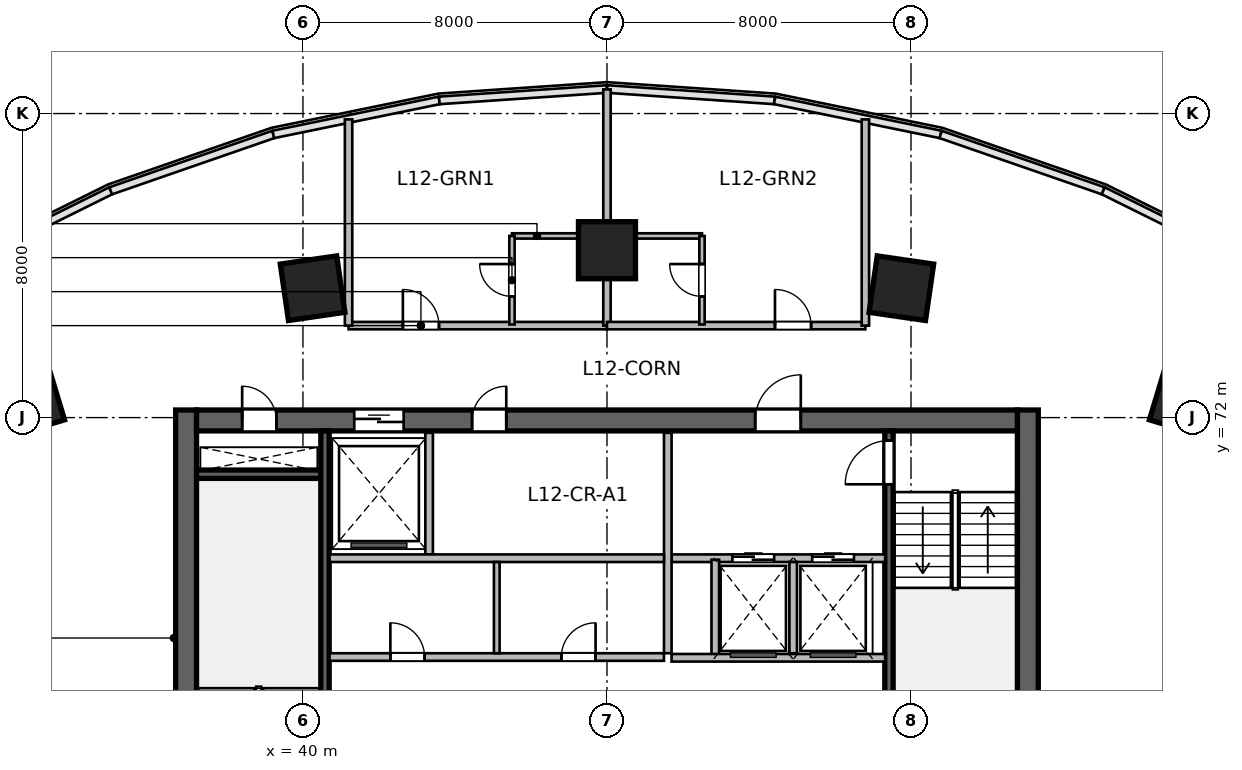
"""IFC4 building model, lengths in metres.
Left out: names, types, materials, properties, quantities, classifications, styles, units other than length and angle.
Written with IfcOpenShell. Run it as: python <this file> out.ifc"""

import sys

from ifc_helpers import new_model, si_unit, direction, frame, frame_2d, origin, origin_2d, place, context, subcontext, project, spatial, rectangle, extrude, source, transform, mapped, element, fill, save


model = new_model("IFC4")
c1 = context("Model", 3, precision=1e-05, world=origin(), true_north=direction((0.0, 1.0)))
c2 = subcontext(c1, "Body", "Model", "MODEL_VIEW")
j1 = project(units=[si_unit("LENGTHUNIT", "METRE"), si_unit("PLANEANGLEUNIT", "RADIAN")], contexts=[c1])
p1 = place(None, origin())
s1 = spatial("IfcSite", under=j1, at=p1, CompositionType="ELEMENT")
p2 = place(p1, origin())
s2 = spatial("IfcBuilding", under=s1, at=p2, CompositionType="ELEMENT")
p3 = place(p2, frame((0.0, 0.0, 57.0)))
s3 = spatial("IfcBuildingStorey", under=s2, at=p3, CompositionType="ELEMENT", Elevation=57.0)
m1 = source(origin(), c2, "Body", "SweptSolid", [
    extrude(rectangle(XDim=12.0, YDim=0.55, at=frame_2d((6.0, 0.0))), origin(), (0.0, 0.0, 1.0), 3.6),
])
for number, where, z_axis, x_axis in (
    (1, (36.925, 60.2, 0.0), (0.0, 0.0, 1.0), (0.0, 1.0, 0.0)),
    (2, (59.075, 60.2, 0.0), (0.0, 0.0, 1.0), (0.0, 1.0, 0.0)),
):
    element("IfcWall", number, at=place(p3, frame(where, z_axis=z_axis, x_axis=x_axis)), inside=s3, PredefinedType="SHEAR", context=c2, shape_type="MappedRepresentation", body=[
        mapped(m1, transform((0.0, 0.0, 0.0), scale=1.0)),
    ])
m2 = source(origin(), c2, "Body", "SweptSolid", [
    extrude(rectangle(XDim=21.6, YDim=0.55, at=frame_2d((10.8, 0.0))), origin(), (0.0, 0.0, 1.0), 3.6),
])
p4 = place(p3, frame((37.2, 71.925, 0.0), z_axis=(0.0, 0.0, 1.0), x_axis=(1.0, 0.0, 0.0)))
e3 = element("IfcWall", 3, at=p4, inside=s3, PredefinedType="SHEAR", context=c2, shape_type="MappedRepresentation", body=[
    mapped(m2, transform((0.0, 0.0, 0.0), scale=1.0)),
])
p5 = place(p4, frame((1.2, 0.0, 0.0)))
e4 = element("IfcOpeningElement", 4, at=p5, cuts=e3, PredefinedType="OPENING", context=c2, shape_type="SweptSolid", body=[
    extrude(rectangle(XDim=0.9, YDim=2.1, at=frame_2d((0.45, 1.05))), frame((0.0, 0.285, 0.0), z_axis=(0.0, -1.0, 0.0), x_axis=(1.0, 0.0, 0.0)), (0.0, 0.0, 1.0), 0.57),
])
p6 = place(p4, frame((14.7, 0.0, 0.0)))
e5 = element("IfcOpeningElement", 5, at=p6, cuts=e3, PredefinedType="OPENING", context=c2, shape_type="SweptSolid", body=[
    extrude(rectangle(XDim=1.2, YDim=2.15, at=frame_2d((0.6, 1.075))), frame((0.0, 0.285, 0.0), z_axis=(0.0, -1.0, 0.0), x_axis=(1.0, 0.0, 0.0)), (0.0, 0.0, 1.0), 0.57),
])
p7 = place(p4, frame((4.15, 0.0, 0.0)))
e6 = element("IfcOpeningElement", 6, at=p7, cuts=e3, PredefinedType="OPENING", context=c2, shape_type="SweptSolid", body=[
    extrude(rectangle(XDim=1.3, YDim=2.15, at=frame_2d((0.65, 1.075))), frame((0.0, 0.285, 0.0), z_axis=(0.0, -1.0, 0.0), x_axis=(1.0, 0.0, 0.0)), (0.0, 0.0, 1.0), 0.57),
])
p8 = place(p4, frame((7.25, 0.0, 0.0)))
e7 = element("IfcOpeningElement", 7, at=p8, cuts=e3, PredefinedType="OPENING", context=c2, shape_type="SweptSolid", body=[
    extrude(rectangle(XDim=0.9, YDim=2.1, at=frame_2d((0.45, 1.05))), frame((0.0, 0.285, 0.0), z_axis=(0.0, -1.0, 0.0), x_axis=(1.0, 0.0, 0.0)), (0.0, 0.0, 1.0), 0.57),
])
m3 = source(origin(), c2, "Body", "SweptSolid", [
    extrude(rectangle(XDim=3.27, YDim=0.22, at=frame_2d((1.635, 0.0))), origin(), (0.0, 0.0, 1.0), 3.6),
])
p9 = place(p3, frame((37.2, 70.51, 0.0), z_axis=(0.0, 0.0, 1.0), x_axis=(1.0, 0.0, 0.0)))
e8 = element("IfcWall", 8, at=p9, inside=s3, PredefinedType="SHEAR", context=c2, shape_type="MappedRepresentation", body=[
    mapped(m3, transform((0.0, 0.0, 0.0), scale=1.0)),
])
m4 = source(origin(), c2, "Body", "SweptSolid", [
    extrude(rectangle(XDim=10.9, YDim=0.22, at=frame_2d((5.45, 0.0))), origin(), (0.0, 0.0, 1.0), 3.6),
])
p10 = place(p3, frame((40.58, 60.75, 0.0), z_axis=(0.0, 0.0, 1.0), x_axis=(0.0, 1.0, 0.0)))
e9 = element("IfcWall", 9, at=p10, inside=s3, PredefinedType="SHEAR", context=c2, shape_type="MappedRepresentation", body=[
    mapped(m4, transform((0.0, 0.0, 0.0), scale=1.0)),
])
p11 = place(p3, frame((55.42, 60.75, 0.0), z_axis=(0.0, 0.0, 1.0), x_axis=(0.0, 1.0, 0.0)))
e10 = element("IfcWall", 10, at=p11, inside=s3, PredefinedType="SHEAR", context=c2, shape_type="MappedRepresentation", body=[
    mapped(m4, transform((0.0, 0.0, 0.0), scale=1.0)),
])
p12 = place(p11, frame((9.495, 0.0, 0.0)))
e11 = element("IfcOpeningElement", 11, at=p12, cuts=e10, PredefinedType="OPENING", context=c2, shape_type="SweptSolid", body=[
    extrude(rectangle(XDim=1.15, YDim=2.15, at=frame_2d((0.575, 1.075))), frame((0.0, 0.12, 0.0), z_axis=(0.0, -1.0, 0.0), x_axis=(1.0, 0.0, 0.0)), (0.0, 0.0, 1.0), 0.24),
])
m5 = source(origin(), c2, "Body", "SweptSolid", [
    extrude(rectangle(XDim=1.5, YDim=1.5, at=origin_2d()), origin(), (0.0, 0.0, 1.0), 3.6),
])
for number, where, z_axis, x_axis in (
    (12, (32.791, 72.442, 0.0), (0.0, 0.0, 1.0), (-0.289, 0.957, 0.0)),
    (13, (40.253, 75.404, 0.0), (0.0, 0.0, 1.0), (-0.143, 0.99, 0.0)),
    (14, (48.0, 76.404, 0.0), (0.0, 0.0, 1.0), (0.0, 1.0, 0.0)),
    (15, (55.747, 75.404, 0.0), (0.0, 0.0, 1.0), (0.143, 0.99, 0.0)),
    (16, (63.209, 72.442, 0.0), (0.0, 0.0, 1.0), (0.289, 0.957, 0.0)),
):
    element("IfcColumn", number, at=place(p3, frame(where, z_axis=z_axis, x_axis=x_axis)), inside=s3, PredefinedType="COLUMN", context=c2, shape_type="MappedRepresentation", body=[
        mapped(m5, transform((0.0, 0.0, 0.0), scale=1.0)),
    ])
m6 = source(origin(), c2, "Body", "SweptSolid", [
    extrude(rectangle(XDim=5.62, YDim=0.2, at=frame_2d((2.81, 0.0))), origin(), (0.0, 0.0, 1.0), 3.36),
])
p13 = place(p3, frame((49.7, 68.3, 0.0), z_axis=(0.0, 0.0, 1.0), x_axis=(1.0, 0.0, 0.0)))
e17 = element("IfcWall", 17, at=p13, inside=s3, PredefinedType="SOLIDWALL", context=c2, shape_type="MappedRepresentation", body=[
    mapped(m6, transform((0.0, 0.0, 0.0), scale=1.0)),
])
p14 = place(p13, frame((1.6, 0.0, 0.0)))
e18 = element("IfcOpeningElement", 18, at=p14, cuts=e17, PredefinedType="OPENING", context=c2, shape_type="SweptSolid", body=[
    extrude(rectangle(XDim=1.1, YDim=2.15, at=frame_2d((0.55, 1.075))), frame((0.0, 0.11, 0.0), z_axis=(0.0, -1.0, 0.0), x_axis=(1.0, 0.0, 0.0)), (0.0, 0.0, 1.0), 0.22),
])
p15 = place(p13, frame((3.7, 0.0, 0.0)))
e19 = element("IfcOpeningElement", 19, at=p15, cuts=e17, PredefinedType="OPENING", context=c2, shape_type="SweptSolid", body=[
    extrude(rectangle(XDim=1.1, YDim=2.15, at=frame_2d((0.55, 1.075))), frame((0.0, 0.11, 0.0), z_axis=(0.0, -1.0, 0.0), x_axis=(1.0, 0.0, 0.0)), (0.0, 0.0, 1.0), 0.22),
])
m7 = source(origin(), c2, "Body", "SweptSolid", [
    extrude(rectangle(XDim=5.8, YDim=0.2, at=frame_2d((2.9, 0.0))), origin(), (0.0, 0.0, 1.0), 3.36),
])
p16 = place(p3, frame((49.6, 65.8, 0.0), z_axis=(0.0, 0.0, 1.0), x_axis=(0.0, 1.0, 0.0)))
e20 = element("IfcWall", 20, at=p16, inside=s3, PredefinedType="SOLIDWALL", context=c2, shape_type="MappedRepresentation", body=[
    mapped(m7, transform((0.0, 0.0, 0.0), scale=1.0)),
])
m8 = source(origin(), c2, "Body", "SweptSolid", [
    extrude(rectangle(XDim=2.58, YDim=0.2, at=frame_2d((1.29, 0.0))), origin(), (0.0, 0.0, 1.0), 3.36),
])
p17 = place(p3, frame((50.85, 65.68, 0.0), z_axis=(0.0, 0.0, 1.0), x_axis=(0.0, 1.0, 0.0)))
e21 = element("IfcWall", 21, at=p17, inside=s3, PredefinedType="SOLIDWALL", context=c2, shape_type="MappedRepresentation", body=[
    mapped(m8, transform((0.0, 0.0, 0.0), scale=1.0)),
])
m9 = source(origin(), c2, "Body", "SweptSolid", [
    extrude(rectangle(XDim=2.4, YDim=0.2, at=frame_2d((1.2, 0.0))), origin(), (0.0, 0.0, 1.0), 3.36),
])
p18 = place(p3, frame((52.9, 65.8, 0.0), z_axis=(0.0, 0.0, 1.0), x_axis=(0.0, 1.0, 0.0)))
e22 = element("IfcWall", 22, at=p18, inside=s3, PredefinedType="SOLIDWALL", context=c2, shape_type="MappedRepresentation", body=[
    mapped(m9, transform((0.0, 0.0, 0.0), scale=1.0)),
])
p19 = place(p3, frame((49.7, 65.68, 0.0), z_axis=(0.0, 0.0, 1.0), x_axis=(1.0, 0.0, 0.0)))
e23 = element("IfcWall", 23, at=p19, inside=s3, PredefinedType="SOLIDWALL", context=c2, shape_type="MappedRepresentation", body=[
    mapped(m6, transform((0.0, 0.0, 0.0), scale=1.0)),
])
m10 = source(origin(), c2, "Body", "SweptSolid", [
    extrude(rectangle(XDim=3.2, YDim=0.2, at=frame_2d((1.6, 0.0))), origin(), (0.0, 0.0, 1.0), 3.36),
])
p20 = place(p3, frame((43.32, 68.4, 0.0), z_axis=(0.0, 0.0, 1.0), x_axis=(0.0, 1.0, 0.0)))
e24 = element("IfcWall", 24, at=p20, inside=s3, PredefinedType="SOLIDWALL", context=c2, shape_type="MappedRepresentation", body=[
    mapped(m10, transform((0.0, 0.0, 0.0), scale=1.0)),
])
m11 = source(origin(), c2, "Body", "SweptSolid", [
    extrude(rectangle(XDim=8.8, YDim=0.2, at=frame_2d((4.4, 0.0))), origin(), (0.0, 0.0, 1.0), 3.36),
])
p21 = place(p3, frame((40.7, 68.3, 0.0), z_axis=(0.0, 0.0, 1.0), x_axis=(1.0, 0.0, 0.0)))
e25 = element("IfcWall", 25, at=p21, inside=s3, PredefinedType="SOLIDWALL", context=c2, shape_type="MappedRepresentation", body=[
    mapped(m11, transform((0.0, 0.0, 0.0), scale=1.0)),
])
p22 = place(p3, frame((40.7, 65.7, 0.0), z_axis=(0.0, 0.0, 1.0), x_axis=(1.0, 0.0, 0.0)))
e26 = element("IfcWall", 26, at=p22, inside=s3, PredefinedType="SOLIDWALL", context=c2, shape_type="MappedRepresentation", body=[
    mapped(m11, transform((0.0, 0.0, 0.0), scale=1.0)),
])
p23 = place(p22, frame((1.6, 0.0, 0.0)))
e27 = element("IfcOpeningElement", 27, at=p23, cuts=e26, PredefinedType="OPENING", context=c2, shape_type="SweptSolid", body=[
    extrude(rectangle(XDim=0.9, YDim=2.1, at=frame_2d((0.45, 1.05))), frame((0.0, 0.11, 0.0), z_axis=(0.0, -1.0, 0.0), x_axis=(1.0, 0.0, 0.0)), (0.0, 0.0, 1.0), 0.22),
])
p24 = place(p22, frame((6.1, 0.0, 0.0)))
e28 = element("IfcOpeningElement", 28, at=p24, cuts=e26, PredefinedType="OPENING", context=c2, shape_type="SweptSolid", body=[
    extrude(rectangle(XDim=0.9, YDim=2.1, at=frame_2d((0.45, 1.05))), frame((0.0, 0.11, 0.0), z_axis=(0.0, -1.0, 0.0), x_axis=(1.0, 0.0, 0.0)), (0.0, 0.0, 1.0), 0.22),
])
m12 = source(origin(), c2, "Body", "SweptSolid", [
    extrude(rectangle(XDim=2.4, YDim=0.15, at=frame_2d((1.2, 0.0))), origin(), (0.0, 0.0, 1.0), 3.36),
])
p25 = place(p3, frame((45.1, 65.8, 0.0), z_axis=(0.0, 0.0, 1.0), x_axis=(0.0, 1.0, 0.0)))
e29 = element("IfcWall", 29, at=p25, inside=s3, PredefinedType="PARTITIONING", context=c2, shape_type="MappedRepresentation", body=[
    mapped(m12, transform((0.0, 0.0, 0.0), scale=1.0)),
])
m13 = source(origin(), c2, "Body", "SweptSolid", [
    extrude(rectangle(XDim=6.8, YDim=0.195, at=frame_2d((3.4, 0.0))), origin(), (0.0, 0.0, 1.0), 3.36),
])
p26 = place(p3, frame((41.2, 74.42, 0.0), z_axis=(0.0, 0.0, 1.0), x_axis=(1.0, 0.0, 0.0)))
e30 = element("IfcWall", 30, at=p26, inside=s3, PredefinedType="PARTITIONING", context=c2, shape_type="MappedRepresentation", body=[
    mapped(m13, transform((0.0, 0.0, 0.0), scale=1.0)),
])
p27 = place(p26, frame((1.429, 0.0, 0.0)))
e31 = element("IfcOpeningElement", 31, at=p27, cuts=e30, PredefinedType="OPENING", context=c2, shape_type="SweptSolid", body=[
    extrude(rectangle(XDim=0.95, YDim=2.15, at=frame_2d((0.475, 1.075))), frame((0.0, 0.107, 0.0), z_axis=(0.0, -1.0, 0.0), x_axis=(1.0, 0.0, 0.0)), (0.0, 0.0, 1.0), 0.215),
])
m14 = source(origin(), c2, "Body", "SweptSolid", [
    extrude(rectangle(XDim=6.216, YDim=0.195, at=frame_2d((3.108, 0.0))), origin(), (0.0, 0.0, 1.0), 2.644),
])
p28 = place(p3, frame((48.0, 74.42, 0.0), z_axis=(0.0, 0.0, 1.0), x_axis=(0.0, 1.0, 0.0)))
e32 = element("IfcWall", 32, at=p28, inside=s3, PredefinedType="PARTITIONING", context=c2, shape_type="MappedRepresentation", body=[
    mapped(m14, transform((0.0, 0.0, 0.0), scale=1.0)),
])
m15 = source(origin(), c2, "Body", "SweptSolid", [
    extrude(rectangle(XDim=5.426, YDim=0.195, at=frame_2d((2.713, 0.0))), origin(), (0.0, 0.0, 1.0), 3.36),
])
p29 = place(p3, frame((41.2, 74.42, 0.0), z_axis=(0.0, 0.0, 1.0), x_axis=(0.0, 1.0, 0.0)))
e33 = element("IfcWall", 33, at=p29, inside=s3, PredefinedType="PARTITIONING", context=c2, shape_type="MappedRepresentation", body=[
    mapped(m15, transform((0.0, 0.0, 0.0), scale=1.0)),
])
m16 = source(origin(), c2, "Body", "SweptSolid", [
    extrude(rectangle(XDim=2.35, YDim=0.14, at=frame_2d((1.175, 0.0))), origin(), (0.0, 0.0, 1.0), 3.36),
])
p30 = place(p3, frame((45.5, 76.78, 0.0), z_axis=(0.0, 0.0, 1.0), x_axis=(1.0, 0.0, 0.0)))
e34 = element("IfcWall", 34, at=p30, inside=s3, PredefinedType="PARTITIONING", context=c2, shape_type="MappedRepresentation", body=[
    mapped(m16, transform((0.0, 0.0, 0.0), scale=1.0)),
])
m17 = source(origin(), c2, "Body", "SweptSolid", [
    extrude(rectangle(XDim=2.33, YDim=0.14, at=frame_2d((1.165, 0.0))), origin(), (0.0, 0.0, 1.0), 3.36),
])
p31 = place(p3, frame((45.5, 74.45, 0.0), z_axis=(0.0, 0.0, 1.0), x_axis=(0.0, 1.0, 0.0)))
e35 = element("IfcWall", 35, at=p31, inside=s3, PredefinedType="PARTITIONING", context=c2, shape_type="MappedRepresentation", body=[
    mapped(m17, transform((0.0, 0.0, 0.0), scale=1.0)),
])
p32 = place(p31, frame((0.74, 0.0, 0.0)))
e36 = element("IfcOpeningElement", 36, at=p32, cuts=e35, PredefinedType="OPENING", context=c2, shape_type="SweptSolid", body=[
    extrude(rectangle(XDim=0.85, YDim=2.05, at=frame_2d((0.425, 1.025))), frame((0.0, 0.08, 0.0), z_axis=(0.0, -1.0, 0.0), x_axis=(1.0, 0.0, 0.0)), (0.0, 0.0, 1.0), 0.16),
])
p33 = place(p3, frame((48.0, 74.42, 0.0), z_axis=(0.0, 0.0, 1.0), x_axis=(1.0, 0.0, 0.0)))
e37 = element("IfcWall", 37, at=p33, inside=s3, PredefinedType="PARTITIONING", context=c2, shape_type="MappedRepresentation", body=[
    mapped(m13, transform((0.0, 0.0, 0.0), scale=1.0)),
])
p34 = place(p33, frame((4.421, 0.0, 0.0)))
e38 = element("IfcOpeningElement", 38, at=p34, cuts=e37, PredefinedType="OPENING", context=c2, shape_type="SweptSolid", body=[
    extrude(rectangle(XDim=0.95, YDim=2.15, at=frame_2d((0.475, 1.075))), frame((0.0, 0.107, 0.0), z_axis=(0.0, -1.0, 0.0), x_axis=(1.0, 0.0, 0.0)), (0.0, 0.0, 1.0), 0.215),
])
p35 = place(p3, frame((54.8, 74.42, 0.0), z_axis=(0.0, 0.0, 1.0), x_axis=(0.0, 1.0, 0.0)))
e39 = element("IfcWall", 39, at=p35, inside=s3, PredefinedType="PARTITIONING", context=c2, shape_type="MappedRepresentation", body=[
    mapped(m15, transform((0.0, 0.0, 0.0), scale=1.0)),
])
p36 = place(p3, frame((48.15, 76.78, 0.0), z_axis=(0.0, 0.0, 1.0), x_axis=(1.0, 0.0, 0.0)))
e40 = element("IfcWall", 40, at=p36, inside=s3, PredefinedType="PARTITIONING", context=c2, shape_type="MappedRepresentation", body=[
    mapped(m16, transform((0.0, 0.0, 0.0), scale=1.0)),
])
p37 = place(p3, frame((50.5, 74.45, 0.0), z_axis=(0.0, 0.0, 1.0), x_axis=(0.0, 1.0, 0.0)))
e41 = element("IfcWall", 41, at=p37, inside=s3, PredefinedType="PARTITIONING", context=c2, shape_type="MappedRepresentation", body=[
    mapped(m17, transform((0.0, 0.0, 0.0), scale=1.0)),
])
p38 = place(p37, frame((0.74, 0.0, 0.0)))
e42 = element("IfcOpeningElement", 42, at=p38, cuts=e41, PredefinedType="OPENING", context=c2, shape_type="SweptSolid", body=[
    extrude(rectangle(XDim=0.85, YDim=2.05, at=frame_2d((0.425, 1.025))), frame((0.0, 0.08, 0.0), z_axis=(0.0, -1.0, 0.0), x_axis=(1.0, 0.0, 0.0)), (0.0, 0.0, 1.0), 0.16),
])
m18 = source(origin(), c2, "Body", "SweptSolid", [
    extrude(rectangle(XDim=0.9, YDim=2.1, at=frame_2d((0.45, 1.05))), frame((0.0, 0.025, 0.0), z_axis=(0.0, -1.0, 0.0), x_axis=(1.0, 0.0, 0.0)), (0.0, 0.0, 1.0), 0.05),
])
p39 = place(p5, origin())
e43 = element("IfcDoor", 43, at=p39, inside=s3, OperationType="SINGLE_SWING_LEFT", PredefinedType="DOOR", context=c2, shape_type="MappedRepresentation", body=[
    mapped(m18, transform((0.0, 0.0, 0.0), scale=1.0)),
])
fill(e4, e43)
m19 = source(origin(), c2, "Body", "SweptSolid", [
    extrude(rectangle(XDim=1.15, YDim=2.15, at=frame_2d((0.575, 1.075))), frame((0.0, 0.025, 0.0), z_axis=(0.0, -1.0, 0.0), x_axis=(1.0, 0.0, 0.0)), (0.0, 0.0, 1.0), 0.05),
])
p40 = place(p12, origin())
e44 = element("IfcDoor", 44, at=p40, inside=s3, OperationType="SINGLE_SWING_LEFT", PredefinedType="DOOR", context=c2, shape_type="MappedRepresentation", body=[
    mapped(m19, transform((0.0, 0.0, 0.0), scale=1.0)),
])
fill(e11, e44)
m20 = source(origin(), c2, "Body", "SweptSolid", [
    extrude(rectangle(XDim=1.2, YDim=2.15, at=frame_2d((0.6, 1.075))), frame((0.0, 0.025, 0.0), z_axis=(0.0, -1.0, 0.0), x_axis=(1.0, 0.0, 0.0)), (0.0, 0.0, 1.0), 0.05),
])
p41 = place(p6, origin())
e45 = element("IfcDoor", 45, at=p41, inside=s3, OperationType="SINGLE_SWING_RIGHT", PredefinedType="DOOR", context=c2, shape_type="MappedRepresentation", body=[
    mapped(m20, transform((0.0, 0.0, 0.0), scale=1.0)),
])
fill(e5, e45)
m21 = source(origin(), c2, "Body", "SweptSolid", [
    extrude(rectangle(XDim=1.1, YDim=2.15, at=frame_2d((0.55, 1.075))), frame((0.0, 0.025, 0.0), z_axis=(0.0, -1.0, 0.0), x_axis=(1.0, 0.0, 0.0)), (0.0, 0.0, 1.0), 0.05),
])
p42 = place(p14, origin())
e46 = element("IfcDoor", 46, at=p42, inside=s3, OperationType="DOUBLE_DOOR_SLIDING", PredefinedType="DOOR", context=c2, shape_type="MappedRepresentation", body=[
    mapped(m21, transform((0.0, 0.0, 0.0), scale=1.0)),
])
fill(e18, e46)
p43 = place(p15, origin())
e47 = element("IfcDoor", 47, at=p43, inside=s3, OperationType="DOUBLE_DOOR_SLIDING", PredefinedType="DOOR", context=c2, shape_type="MappedRepresentation", body=[
    mapped(m21, transform((0.0, 0.0, 0.0), scale=1.0)),
])
fill(e19, e47)
m22 = source(origin(), c2, "Body", "SweptSolid", [
    extrude(rectangle(XDim=1.3, YDim=2.15, at=frame_2d((0.65, 1.075))), frame((0.0, 0.025, 0.0), z_axis=(0.0, -1.0, 0.0), x_axis=(1.0, 0.0, 0.0)), (0.0, 0.0, 1.0), 0.05),
])
p44 = place(p7, origin())
e48 = element("IfcDoor", 48, at=p44, inside=s3, OperationType="DOUBLE_DOOR_SLIDING", PredefinedType="DOOR", context=c2, shape_type="MappedRepresentation", body=[
    mapped(m22, transform((0.0, 0.0, 0.0), scale=1.0)),
])
fill(e6, e48)
p45 = place(p8, origin())
e49 = element("IfcDoor", 49, at=p45, inside=s3, OperationType="SINGLE_SWING_RIGHT", PredefinedType="DOOR", context=c2, shape_type="MappedRepresentation", body=[
    mapped(m18, transform((0.0, 0.0, 0.0), scale=1.0)),
])
fill(e7, e49)
p46 = place(p23, origin())
e50 = element("IfcDoor", 50, at=p46, inside=s3, OperationType="SINGLE_SWING_LEFT", PredefinedType="DOOR", context=c2, shape_type="MappedRepresentation", body=[
    mapped(m18, transform((0.0, 0.0, 0.0), scale=1.0)),
])
fill(e27, e50)
p47 = place(p24, origin())
e51 = element("IfcDoor", 51, at=p47, inside=s3, OperationType="SINGLE_SWING_RIGHT", PredefinedType="DOOR", context=c2, shape_type="MappedRepresentation", body=[
    mapped(m18, transform((0.0, 0.0, 0.0), scale=1.0)),
])
fill(e28, e51)
m23 = source(origin(), c2, "Body", "SweptSolid", [
    extrude(rectangle(XDim=0.95, YDim=2.15, at=frame_2d((0.475, 1.075))), frame((0.0, 0.025, 0.0), z_axis=(0.0, -1.0, 0.0), x_axis=(1.0, 0.0, 0.0)), (0.0, 0.0, 1.0), 0.05),
])
p48 = place(p27, origin())
e52 = element("IfcDoor", 52, at=p48, inside=s3, OperationType="SINGLE_SWING_LEFT", PredefinedType="DOOR", context=c2, shape_type="MappedRepresentation", body=[
    mapped(m23, transform((0.0, 0.0, 0.0), scale=1.0)),
])
fill(e31, e52)
m24 = source(origin(), c2, "Body", "SweptSolid", [
    extrude(rectangle(XDim=0.85, YDim=2.05, at=frame_2d((0.425, 1.025))), frame((0.0, 0.025, 0.0), z_axis=(0.0, -1.0, 0.0), x_axis=(1.0, 0.0, 0.0)), (0.0, 0.0, 1.0), 0.05),
])
p49 = place(p32, origin())
e53 = element("IfcDoor", 53, at=p49, inside=s3, OperationType="SINGLE_SWING_RIGHT", PredefinedType="DOOR", context=c2, shape_type="MappedRepresentation", body=[
    mapped(m24, transform((0.0, 0.0, 0.0), scale=1.0)),
])
fill(e36, e53)
p50 = place(p34, origin())
e54 = element("IfcDoor", 54, at=p50, inside=s3, OperationType="SINGLE_SWING_LEFT", PredefinedType="DOOR", context=c2, shape_type="MappedRepresentation", body=[
    mapped(m23, transform((0.0, 0.0, 0.0), scale=1.0)),
])
fill(e38, e54)
p51 = place(p38, origin())
e55 = element("IfcDoor", 55, at=p51, inside=s3, OperationType="SINGLE_SWING_RIGHT", PredefinedType="DOOR", context=c2, shape_type="MappedRepresentation", body=[
    mapped(m24, transform((0.0, 0.0, 0.0), scale=1.0)),
])
fill(e42, e55)
save(model, sys.argv[1])
